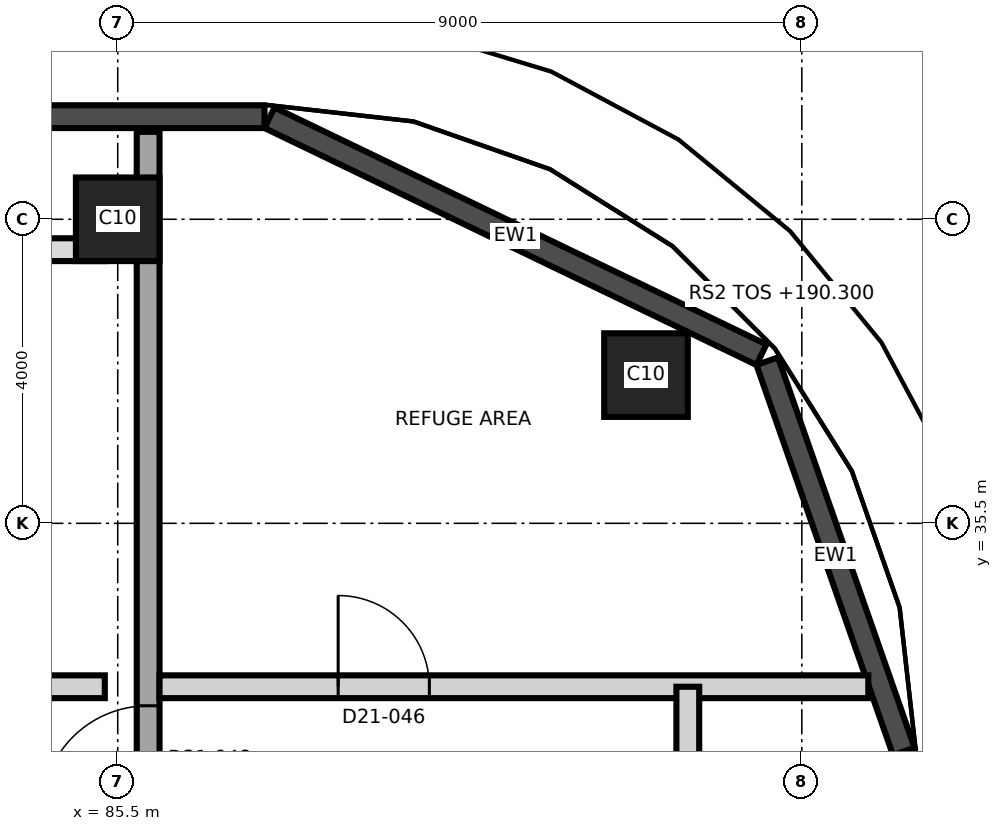
"""IFC4 building model, lengths in metres.
Left out: names, types, materials, properties, quantities, classifications, styles, units other than length and angle.
Written with IfcOpenShell. Run it as: python <this file> out.ifc"""

import sys

from ifc_helpers import new_model, si_unit, direction, frame, frame_2d, origin, origin_2d, place, context, subcontext, project, spatial, rectangle, extrude, element, fill, save


model = new_model("IFC4")
c1 = context("Model", 3, precision=1e-05, world=origin(), true_north=direction((0.0, 1.0)))
c2 = subcontext(c1, "Body", "Model", "MODEL_VIEW")
j1 = project(units=[si_unit("LENGTHUNIT", "METRE"), si_unit("PLANEANGLEUNIT", "RADIAN")], contexts=[c1])
p1 = place(None, origin())
s1 = spatial("IfcSite", under=j1, at=p1, CompositionType="ELEMENT")
p2 = place(p1, origin())
s2 = spatial("IfcBuilding", under=s1, at=p2, CompositionType="ELEMENT")
p3 = place(p2, frame((0.0, 0.0, 190.3)))
s3 = spatial("IfcBuildingStorey", under=s2, at=p3, CompositionType="ELEMENT", Elevation=190.3)
for number, where, z_axis, x_axis in (
    (1, (92.45, 37.45, 0.0), (0.0, 0.0, 1.0), (1.0, 0.0, 0.0)),
    (2, (85.5, 39.5, 0.0), (0.0, 0.0, 1.0), (1.0, 0.0, 0.0)),
):
    element("IfcColumn", number, at=place(p3, frame(where, z_axis=z_axis, x_axis=x_axis)), inside=s3, PredefinedType="COLUMN", context=c2, shape_type="SweptSolid", body=[
        extrude(rectangle(XDim=1.1, YDim=1.1, at=origin_2d()), origin(), (0.0, 0.0, 1.0), 5.5),
    ])
p4 = place(p3, frame((85.9, 20.35, 0.0), z_axis=(0.0, 0.0, 1.0), x_axis=(0.0, 1.0, 0.0)))
e3 = element("IfcWall", 3, at=p4, inside=s3, PredefinedType="SHEAR", context=c2, shape_type="SweptSolid", body=[
    extrude(rectangle(XDim=20.3, YDim=0.3, at=frame_2d((10.15, 0.0))), origin(), (0.0, 0.0, 1.0), 5.5),
])
p5 = place(p4, frame((11.35, 0.0, 0.0)))
e4 = element("IfcOpeningElement", 4, at=p5, cuts=e3, PredefinedType="OPENING", context=c2, shape_type="SweptSolid", body=[
    extrude(rectangle(XDim=1.4, YDim=2.1, at=frame_2d((0.7, 1.05))), frame((0.0, 0.16, 0.0), z_axis=(0.0, -1.0, 0.0), x_axis=(1.0, 0.0, 0.0)), (0.0, 0.0, 1.0), 0.32),
])
p6 = place(p3, frame((95.842, 32.499, 0.0), z_axis=(0.0, 0.0, 1.0), x_axis=(-0.330290447423, 0.943879346284, 0.0)))
e5 = element("IfcWall", 5, at=p6, inside=s3, PredefinedType="SOLIDWALL", context=c2, shape_type="SweptSolid", body=[
    extrude(rectangle(XDim=5.439, YDim=0.3, at=frame_2d((2.72, 0.0))), origin(), (0.0, 0.0, 1.0), 5.2),
])
p7 = place(p3, frame((93.969, 37.719, 0.0), z_axis=(0.0, 0.0, 1.0), x_axis=(-0.90096968593, 0.433882040461, 0.0)))
e6 = element("IfcWall", 6, at=p7, inside=s3, PredefinedType="SOLIDWALL", context=c2, shape_type="SweptSolid", body=[
    extrude(rectangle(XDim=7.183, YDim=0.3, at=frame_2d((3.592, 0.0))), origin(), (0.0, 0.0, 1.0), 5.2),
])
p8 = place(p3, frame((87.432, 40.85, 0.0), z_axis=(0.0, 0.0, 1.0), x_axis=(-1.0, 0.0, 0.0)))
e7 = element("IfcWall", 7, at=p8, inside=s3, PredefinedType="SOLIDWALL", context=c2, shape_type="SweptSolid", body=[
    extrude(rectangle(XDim=31.932, YDim=0.3, at=frame_2d((15.966, 0.0))), origin(), (0.0, 0.0, 1.0), 5.2),
])
p9 = place(p3, frame((58.65, 33.35, 0.0), z_axis=(0.0, 0.0, 1.0), x_axis=(1.0, 0.0, 0.0)))
e8 = element("IfcWall", 8, at=p9, inside=s3, PredefinedType="PARTITIONING", context=c2, shape_type="SweptSolid", body=[
    extrude(rectangle(XDim=26.68, YDim=0.3, at=frame_2d((13.34, 0.0))), origin(), (0.0, 0.0, 1.0), 5.2),
])
p10 = place(p9, frame((1.5, 0.0, 0.0)))
e9 = element("IfcOpeningElement", 9, at=p10, cuts=e8, PredefinedType="OPENING", context=c2, shape_type="SweptSolid", body=[
    extrude(rectangle(XDim=1.2, YDim=2.1, at=frame_2d((0.6, 1.05))), frame((0.0, 0.16, 0.0), z_axis=(0.0, -1.0, 0.0), x_axis=(1.0, 0.0, 0.0)), (0.0, 0.0, 1.0), 0.32),
])
p11 = place(p9, frame((6.0, 0.0, 0.0)))
e10 = element("IfcOpeningElement", 10, at=p11, cuts=e8, PredefinedType="OPENING", context=c2, shape_type="SweptSolid", body=[
    extrude(rectangle(XDim=1.2, YDim=2.1, at=frame_2d((0.6, 1.05))), frame((0.0, 0.16, 0.0), z_axis=(0.0, -1.0, 0.0), x_axis=(1.0, 0.0, 0.0)), (0.0, 0.0, 1.0), 0.32),
])
p12 = place(p9, frame((10.5, 0.0, 0.0)))
e11 = element("IfcOpeningElement", 11, at=p12, cuts=e8, PredefinedType="OPENING", context=c2, shape_type="SweptSolid", body=[
    extrude(rectangle(XDim=1.2, YDim=2.1, at=frame_2d((0.6, 1.05))), frame((0.0, 0.16, 0.0), z_axis=(0.0, -1.0, 0.0), x_axis=(1.0, 0.0, 0.0)), (0.0, 0.0, 1.0), 0.32),
])
p13 = place(p9, frame((15.0, 0.0, 0.0)))
e12 = element("IfcOpeningElement", 12, at=p13, cuts=e8, PredefinedType="OPENING", context=c2, shape_type="SweptSolid", body=[
    extrude(rectangle(XDim=1.2, YDim=2.1, at=frame_2d((0.6, 1.05))), frame((0.0, 0.16, 0.0), z_axis=(0.0, -1.0, 0.0), x_axis=(1.0, 0.0, 0.0)), (0.0, 0.0, 1.0), 0.32),
])
p14 = place(p9, frame((19.5, 0.0, 0.0)))
e13 = element("IfcOpeningElement", 13, at=p14, cuts=e8, PredefinedType="OPENING", context=c2, shape_type="SweptSolid", body=[
    extrude(rectangle(XDim=1.2, YDim=2.1, at=frame_2d((0.6, 1.05))), frame((0.0, 0.16, 0.0), z_axis=(0.0, -1.0, 0.0), x_axis=(1.0, 0.0, 0.0)), (0.0, 0.0, 1.0), 0.32),
])
p15 = place(p9, frame((24.0, 0.0, 0.0)))
e14 = element("IfcOpeningElement", 14, at=p15, cuts=e8, PredefinedType="OPENING", context=c2, shape_type="SweptSolid", body=[
    extrude(rectangle(XDim=1.2, YDim=2.1, at=frame_2d((0.6, 1.05))), frame((0.0, 0.16, 0.0), z_axis=(0.0, -1.0, 0.0), x_axis=(1.0, 0.0, 0.0)), (0.0, 0.0, 1.0), 0.32),
])
p16 = place(p3, frame((86.05, 33.35, 0.0), z_axis=(0.0, 0.0, 1.0), x_axis=(1.0, 0.0, 0.0)))
e15 = element("IfcWall", 15, at=p16, inside=s3, PredefinedType="PARTITIONING", context=c2, shape_type="SweptSolid", body=[
    extrude(rectangle(XDim=9.325, YDim=0.3, at=frame_2d((4.663, 0.0))), origin(), (0.0, 0.0, 1.0), 5.2),
])
p17 = place(p16, frame((2.35, 0.0, 0.0)))
e16 = element("IfcOpeningElement", 16, at=p17, cuts=e15, PredefinedType="OPENING", context=c2, shape_type="SweptSolid", body=[
    extrude(rectangle(XDim=1.2, YDim=2.1, at=frame_2d((0.6, 1.05))), frame((0.0, 0.16, 0.0), z_axis=(0.0, -1.0, 0.0), x_axis=(1.0, 0.0, 0.0)), (0.0, 0.0, 1.0), 0.32),
])
p18 = place(p3, frame((58.65, 39.1, 0.0), z_axis=(0.0, 0.0, 1.0), x_axis=(1.0, 0.0, 0.0)))
e17 = element("IfcWall", 17, at=p18, inside=s3, PredefinedType="PARTITIONING", context=c2, shape_type="SweptSolid", body=[
    extrude(rectangle(XDim=26.68, YDim=0.3, at=frame_2d((13.34, 0.0))), origin(), (0.0, 0.0, 1.0), 5.2),
])
p19 = place(p3, frame((93.0, 30.65, 0.0), z_axis=(0.0, 0.0, 1.0), x_axis=(0.0, 1.0, 0.0)))
e18 = element("IfcWall", 18, at=p19, inside=s3, PredefinedType="PARTITIONING", context=c2, shape_type="SweptSolid", body=[
    extrude(rectangle(XDim=2.7, YDim=0.3, at=frame_2d((1.35, 0.0))), origin(), (0.0, 0.0, 1.0), 5.2),
])
p20 = place(p17, origin())
e19 = element("IfcDoor", 19, at=p20, inside=s3, OperationType="SINGLE_SWING_LEFT", PredefinedType="DOOR", context=c2, shape_type="SweptSolid", body=[
    extrude(rectangle(XDim=1.2, YDim=2.1, at=frame_2d((0.6, 1.05))), frame((0.0, 0.025, 0.0), z_axis=(0.0, -1.0, 0.0), x_axis=(1.0, 0.0, 0.0)), (0.0, 0.0, 1.0), 0.05),
])
fill(e16, e19)
p21 = place(p5, origin())
e20 = element("IfcDoor", 20, at=p21, inside=s3, OperationType="SINGLE_SWING_RIGHT", PredefinedType="DOOR", context=c2, shape_type="SweptSolid", body=[
    extrude(rectangle(XDim=1.4, YDim=2.1, at=frame_2d((0.7, 1.05))), frame((0.0, 0.025, 0.0), z_axis=(0.0, -1.0, 0.0), x_axis=(1.0, 0.0, 0.0)), (0.0, 0.0, 1.0), 0.05),
])
fill(e4, e20)
save(model, sys.argv[1])
